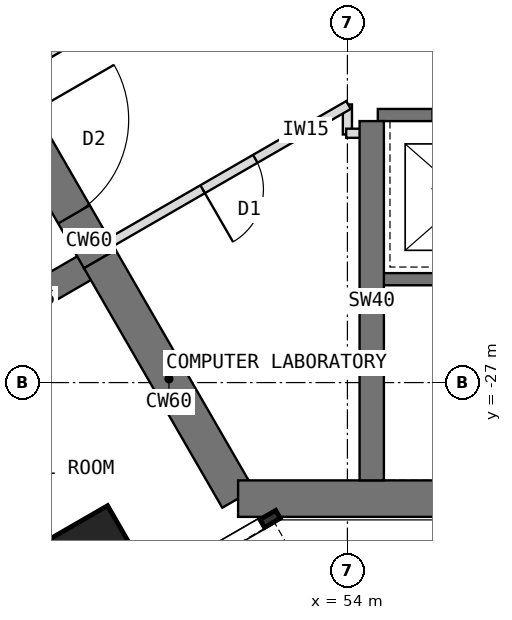
"""IFC4 building model, lengths in metres.
Left out: names, types, materials, properties, quantities, classifications, styles, units other than length and angle.
Written with IfcOpenShell. Run it as: python <this file> out.ifc"""

import sys

from ifc_helpers import new_model, si_unit, direction, frame, frame_2d, origin, origin_2d, place, context, subcontext, project, spatial, rectangle, extrude, element, fill, save


model = new_model("IFC4")
c1 = context("Model", 3, precision=1e-05, world=origin(), true_north=direction((0.0, 1.0)))
c2 = subcontext(c1, "Body", "Model", "MODEL_VIEW")
j1 = project(units=[si_unit("LENGTHUNIT", "METRE"), si_unit("PLANEANGLEUNIT", "RADIAN")], contexts=[c1])
p1 = place(None, origin())
s1 = spatial("IfcSite", under=j1, at=p1, CompositionType="ELEMENT")
p2 = place(p1, origin())
s2 = spatial("IfcBuilding", under=s1, at=p2, CompositionType="ELEMENT")
p3 = place(p2, frame((0.0, 0.0, 101.5)))
s3 = spatial("IfcBuildingStorey", under=s2, at=p3, CompositionType="ELEMENT", Elevation=101.5)
p4 = place(p3, frame((48.178, -21.939, 0.0), z_axis=(0.0, 0.0, 1.0), x_axis=(0.500010275428, -0.866019471182, 0.0)))
e1 = element("IfcWall", 1, at=p4, inside=s3, PredefinedType="SHEAR", context=c2, shape_type="SweptSolid", body=[
    extrude(rectangle(XDim=3.5, YDim=0.6, at=frame_2d((1.75, 0.0))), origin(), (0.0, 0.0, 1.0), 4.0),
])
p5 = place(p4, frame((0.85, 0.0, 0.0)))
e2 = element("IfcOpeningElement", 2, at=p5, cuts=e1, PredefinedType="OPENING", context=c2, shape_type="SweptSolid", body=[
    extrude(rectangle(XDim=1.8, YDim=2.1, at=frame_2d((0.9, 1.05))), frame((0.0, 0.31, 0.0), z_axis=(0.0, -1.0, 0.0), x_axis=(1.0, 0.0, 0.0)), (0.0, 0.0, 1.0), 0.62),
])
p6 = place(p3, frame((49.928, -24.97, 0.0), z_axis=(0.0, 0.0, 1.0), x_axis=(0.499984222037, -0.866034513004, 0.0)))
e3 = element("IfcWall", 3, at=p6, inside=s3, PredefinedType="SHEAR", context=c2, shape_type="SweptSolid", body=[
    extrude(rectangle(XDim=4.548, YDim=0.6, at=frame_2d((2.274, 0.0))), origin(), (0.0, 0.0, 1.0), 4.0),
])
p7 = place(p3, frame((52.202, -28.908, 0.0), z_axis=(0.0, 0.0, 1.0), x_axis=(1.0, 0.0, 0.0)))
e4 = element("IfcWall", 4, at=p7, inside=s3, PredefinedType="SHEAR", context=c2, shape_type="SweptSolid", body=[
    extrude(rectangle(XDim=12.596, YDim=0.6, at=frame_2d((6.298, 0.0))), origin(), (0.0, 0.0, 1.0), 4.0),
])
p8 = place(p3, frame((49.928, -24.97, 0.0), z_axis=(0.0, 0.0, 1.0), x_axis=(-0.866031863473, -0.499988811324, 0.0)))
e5 = element("IfcWall", 5, at=p8, inside=s3, PredefinedType="SHEAR", context=c2, shape_type="SweptSolid", body=[
    extrude(rectangle(XDim=2.592, YDim=0.45, at=frame_2d((1.296, 0.0))), origin(), (0.0, 0.0, 1.0), 4.0),
])
p9 = place(p3, frame((49.809, -29.946, 0.0), z_axis=(0.0, 0.0, 1.0), x_axis=(0.866025403784, 0.5, 0.0)))
e6 = element("IfcColumn", 6, at=p9, inside=s3, PredefinedType="COLUMN", context=c2, shape_type="SweptSolid", body=[
    extrude(rectangle(XDim=1.35, YDim=1.35, at=origin_2d()), origin(), (0.0, 0.0, 1.0), 4.0),
])
p10 = place(p3, frame((54.5, -22.6, 0.0), z_axis=(0.0, 0.0, 1.0), x_axis=(1.0, 0.0, 0.0)))
e7 = element("IfcWall", 7, at=p10, inside=s3, PredefinedType="SHEAR", context=c2, shape_type="SweptSolid", body=[
    extrude(rectangle(XDim=8.0, YDim=0.2, at=frame_2d((4.0, 0.0))), origin(), (0.0, 0.0, 1.0), 4.0),
])
p11 = place(p10, frame((6.3, 0.0, 0.0)))
e8 = element("IfcOpeningElement", 8, at=p11, cuts=e7, PredefinedType="OPENING", context=c2, shape_type="SweptSolid", body=[
    extrude(rectangle(XDim=1.2, YDim=2.1, at=frame_2d((0.6, 1.05))), frame((0.0, 0.11, 0.0), z_axis=(0.0, -1.0, 0.0), x_axis=(1.0, 0.0, 0.0)), (0.0, 0.0, 1.0), 0.22),
])
p12 = place(p10, frame((0.9, 0.0, 0.0)))
e9 = element("IfcOpeningElement", 9, at=p12, cuts=e7, PredefinedType="OPENING", context=c2, shape_type="SweptSolid", body=[
    extrude(rectangle(XDim=1.1, YDim=2.2, at=frame_2d((0.55, 1.1))), frame((0.0, 0.11, 0.0), z_axis=(0.0, -1.0, 0.0), x_axis=(1.0, 0.0, 0.0)), (0.0, 0.0, 1.0), 0.22),
])
p13 = place(p3, frame((54.5, -25.3, 0.0), z_axis=(0.0, 0.0, 1.0), x_axis=(1.0, 0.0, 0.0)))
e10 = element("IfcWall", 10, at=p13, inside=s3, PredefinedType="SHEAR", context=c2, shape_type="SweptSolid", body=[
    extrude(rectangle(XDim=8.0, YDim=0.2, at=frame_2d((4.0, 0.0))), origin(), (0.0, 0.0, 1.0), 4.0),
])
p14 = place(p13, frame((6.7, 0.0, 0.0)))
e11 = element("IfcOpeningElement", 11, at=p14, cuts=e10, PredefinedType="OPENING", context=c2, shape_type="SweptSolid", body=[
    extrude(rectangle(XDim=1.1, YDim=2.1, at=frame_2d((0.55, 1.05))), frame((0.0, 0.11, 0.0), z_axis=(0.0, -1.0, 0.0), x_axis=(1.0, 0.0, 0.0)), (0.0, 0.0, 1.0), 0.22),
])
p15 = place(p3, frame((54.4, -22.7, 0.0), z_axis=(0.0, 0.0, 1.0), x_axis=(0.0, -1.0, 0.0)))
e12 = element("IfcWall", 12, at=p15, inside=s3, PredefinedType="SHEAR", context=c2, shape_type="SweptSolid", body=[
    extrude(rectangle(XDim=5.908, YDim=0.4, at=frame_2d((2.954, 0.0))), origin(), (0.0, 0.0, 1.0), 4.0),
])
p16 = place(p3, frame((54.0, -22.92, 0.0), z_axis=(0.0, 0.0, 1.0), x_axis=(0.0, 1.0, 0.0)))
e13 = element("IfcWall", 13, at=p16, inside=s3, PredefinedType="PARTITIONING", context=c2, shape_type="SweptSolid", body=[
    extrude(rectangle(XDim=0.494, YDim=0.15, at=frame_2d((0.247, 0.0))), origin(), (0.0, 0.0, 1.0), 3.8),
])
p17 = place(p3, frame((54.017, -22.436, 0.0), z_axis=(0.0, 0.0, 1.0), x_axis=(-0.86602002524, -0.500009315796, 0.0)))
e14 = element("IfcWall", 14, at=p17, inside=s3, PredefinedType="PARTITIONING", context=c2, shape_type="SweptSolid", body=[
    extrude(rectangle(XDim=4.519, YDim=0.15, at=frame_2d((2.259, 0.0))), origin(), (0.0, 0.0, 1.0), 3.8),
])
p18 = place(p17, frame((1.769, 0.0, 0.0)))
e15 = element("IfcOpeningElement", 15, at=p18, cuts=e14, PredefinedType="OPENING", context=c2, shape_type="SweptSolid", body=[
    extrude(rectangle(XDim=1.0, YDim=2.1, at=frame_2d((0.5, 1.05))), frame((0.0, 0.085, 0.0), z_axis=(0.0, -1.0, 0.0), x_axis=(1.0, 0.0, 0.0)), (0.0, 0.0, 1.0), 0.17),
])
p19 = place(p3, frame((48.504, -21.924, 0.0), z_axis=(0.0, 0.0, 1.0), x_axis=(0.866006515865, 0.500032713409, 0.0)))
e16 = element("IfcWall", 16, at=p19, inside=s3, PredefinedType="PARTITIONING", context=c2, shape_type="SweptSolid", body=[
    extrude(rectangle(XDim=4.518, YDim=0.15, at=frame_2d((2.259, 0.0))), origin(), (0.0, 0.0, 1.0), 3.8),
])
p20 = place(p19, frame((1.749, 0.0, 0.0)))
e17 = element("IfcOpeningElement", 17, at=p20, cuts=e16, PredefinedType="OPENING", context=c2, shape_type="SweptSolid", body=[
    extrude(rectangle(XDim=1.0, YDim=2.1, at=frame_2d((0.5, 1.05))), frame((0.0, 0.085, 0.0), z_axis=(0.0, -1.0, 0.0), x_axis=(1.0, 0.0, 0.0)), (0.0, 0.0, 1.0), 0.17),
])
p21 = place(p3, frame((54.41, -22.9, 0.0), z_axis=(0.0, 0.0, 1.0), x_axis=(-1.0, 0.0, 0.0)))
e18 = element("IfcWall", 18, at=p21, inside=s3, PredefinedType="PARTITIONING", context=c2, shape_type="SweptSolid", body=[
    extrude(rectangle(XDim=0.43, YDim=0.15, at=frame_2d((0.215, 0.0))), origin(), (0.0, 0.0, 1.0), 3.8),
])
p22 = place(p5, origin())
e19 = element("IfcDoor", 19, at=p22, inside=s3, OperationType="DOUBLE_DOOR_DOUBLE_SWING", PredefinedType="DOOR", context=c2, shape_type="SweptSolid", body=[
    extrude(rectangle(XDim=1.72, YDim=2.06, at=frame_2d((0.9, 1.03))), frame((0.0, 0.025, 0.0), z_axis=(0.0, -1.0, 0.0), x_axis=(1.0, 0.0, 0.0)), (0.0, 0.0, 1.0), 0.05),
    extrude(rectangle(XDim=0.04, YDim=2.1, at=frame_2d((0.02, 1.05))), frame((0.0, 0.3, 0.0), z_axis=(0.0, -1.0, 0.0), x_axis=(1.0, 0.0, 0.0)), (0.0, 0.0, 1.0), 0.6),
    extrude(rectangle(XDim=0.04, YDim=2.1, at=frame_2d((1.78, 1.05))), frame((0.0, 0.3, 0.0), z_axis=(0.0, -1.0, 0.0), x_axis=(1.0, 0.0, 0.0)), (0.0, 0.0, 1.0), 0.6),
    extrude(rectangle(XDim=1.72, YDim=0.04, at=frame_2d((0.9, 2.08))), frame((0.0, 0.3, 0.0), z_axis=(0.0, -1.0, 0.0), x_axis=(1.0, 0.0, 0.0)), (0.0, 0.0, 1.0), 0.6),
])
fill(e2, e19)
p23 = place(p18, origin())
e20 = element("IfcDoor", 20, at=p23, inside=s3, OperationType="SINGLE_SWING_RIGHT", PredefinedType="DOOR", context=c2, shape_type="SweptSolid", body=[
    extrude(rectangle(XDim=1.0, YDim=2.1, at=frame_2d((0.5, 1.05))), frame((0.0, 0.025, 0.0), z_axis=(0.0, -1.0, 0.0), x_axis=(1.0, 0.0, 0.0)), (0.0, 0.0, 1.0), 0.05),
])
fill(e15, e20)
save(model, sys.argv[1])
